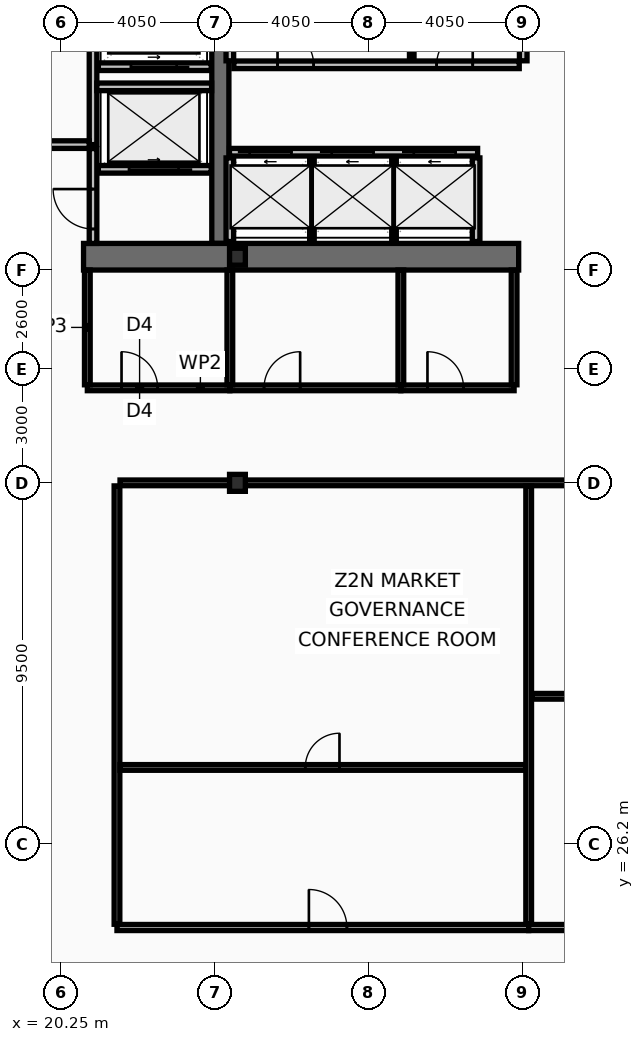
"""IFC4 building model, lengths in metres.
Left out: names, types, materials, properties, quantities, classifications, styles, units other than length and angle.
Written with IfcOpenShell. Run it as: python <this file> out.ifc"""

import sys

from ifc_helpers import new_model, si_unit, direction, frame, frame_2d, origin, origin_2d, place, context, subcontext, project, spatial, rectangle, i_section, extrude, element, fill, save


model = new_model("IFC4")
c1 = context("Model", 3, precision=1e-05, world=origin(), true_north=direction((0.0, 1.0)))
c2 = subcontext(c1, "Body", "Model", "MODEL_VIEW")
j1 = project(units=[si_unit("LENGTHUNIT", "METRE"), si_unit("PLANEANGLEUNIT", "RADIAN")], contexts=[c1])
p1 = place(None, origin())
s1 = spatial("IfcSite", under=j1, at=p1, CompositionType="ELEMENT")
p2 = place(p1, origin())
s2 = spatial("IfcBuilding", under=s1, at=p2, CompositionType="ELEMENT")
p3 = place(p2, frame((0.0, 0.0, 165.0)))
s3 = spatial("IfcBuildingStorey", under=s2, at=p3, CompositionType="ELEMENT", Elevation=165.0)
p4 = place(p3, frame((24.45, 42.0, 0.0), z_axis=(0.0, 0.0, 1.0), x_axis=(0.0, 1.0, 0.0)))
e1 = element("IfcWall", 1, at=p4, inside=s3, PredefinedType="SHEAR", context=c2, shape_type="SweptSolid", body=[
    extrude(rectangle(XDim=11.0, YDim=0.45, at=frame_2d((5.5, 0.0))), origin(), (0.0, 0.0, 1.0), 3.44),
])
p5 = place(p3, frame((32.3, 41.65, 0.0), z_axis=(0.0, 0.0, 1.0), x_axis=(-1.0, 0.0, 0.0)))
e2 = element("IfcWall", 2, at=p5, inside=s3, PredefinedType="SHEAR", context=c2, shape_type="SweptSolid", body=[
    extrude(rectangle(XDim=11.45, YDim=0.7, at=frame_2d((5.725, 0.0))), origin(), (0.0, 0.0, 1.0), 3.44),
])
for number, where, z_axis, x_axis in (
    (3, (24.9, 35.7, 0.0), (0.0, 0.0, 1.0), (1.0, 0.0, 0.0)),
    (4, (24.9, 41.65, 0.0), (0.0, 0.0, 1.0), (1.0, 0.0, 0.0)),
):
    element("IfcColumn", number, at=place(p3, frame(where, z_axis=z_axis, x_axis=x_axis)), inside=s3, PredefinedType="COLUMN", context=c2, shape_type="SweptSolid", body=[
        extrude(i_section(OverallWidth=0.416, OverallDepth=0.446, WebThickness=0.039, FlangeThickness=0.063, at=origin_2d()), origin(), (0.0, 0.0, 1.0), 3.6),
    ])
p6 = place(p3, frame((24.69, 44.4, 0.0), z_axis=(0.0, 0.0, 1.0), x_axis=(1.0, 0.0, 0.0)))
e5 = element("IfcWall", 5, at=p6, inside=s3, PredefinedType="PARTITIONING", context=c2, shape_type="SweptSolid", body=[
    extrude(rectangle(XDim=6.53, YDim=0.2, at=frame_2d((3.265, 0.0))), origin(), (0.0, 0.0, 1.0), 3.44),
])
p7 = place(p6, frame((0.53, 0.0, 0.0)))
e6 = element("IfcOpeningElement", 6, at=p7, cuts=e5, PredefinedType="OPENING", context=c2, shape_type="SweptSolid", body=[
    extrude(rectangle(XDim=1.1, YDim=2.18, at=frame_2d((0.55, 1.09))), frame((0.0, 0.11, 0.0), z_axis=(0.0, -1.0, 0.0), x_axis=(1.0, 0.0, 0.0)), (0.0, 0.0, 1.0), 0.22),
])
p8 = place(p6, frame((2.69, 0.0, 0.0)))
e7 = element("IfcOpeningElement", 7, at=p8, cuts=e5, PredefinedType="OPENING", context=c2, shape_type="SweptSolid", body=[
    extrude(rectangle(XDim=1.1, YDim=2.18, at=frame_2d((0.55, 1.09))), frame((0.0, 0.11, 0.0), z_axis=(0.0, -1.0, 0.0), x_axis=(1.0, 0.0, 0.0)), (0.0, 0.0, 1.0), 0.22),
])
p9 = place(p6, frame((4.85, 0.0, 0.0)))
e8 = element("IfcOpeningElement", 8, at=p9, cuts=e5, PredefinedType="OPENING", context=c2, shape_type="SweptSolid", body=[
    extrude(rectangle(XDim=1.1, YDim=2.18, at=frame_2d((0.55, 1.09))), frame((0.0, 0.11, 0.0), z_axis=(0.0, -1.0, 0.0), x_axis=(1.0, 0.0, 0.0)), (0.0, 0.0, 1.0), 0.22),
])
p10 = place(p3, frame((24.21, 43.95, 0.0), z_axis=(0.0, 0.0, 1.0), x_axis=(-1.0, 0.0, 0.0)))
e9 = element("IfcWall", 9, at=p10, inside=s3, PredefinedType="PARTITIONING", context=c2, shape_type="SweptSolid", body=[
    extrude(rectangle(XDim=2.97, YDim=0.2, at=frame_2d((1.485, 0.0))), origin(), (0.0, 0.0, 1.0), 3.44),
])
p11 = place(p10, frame((0.86, 0.0, 0.0)))
e10 = element("IfcOpeningElement", 10, at=p11, cuts=e9, PredefinedType="OPENING", context=c2, shape_type="SweptSolid", body=[
    extrude(rectangle(XDim=1.3, YDim=2.18, at=frame_2d((0.65, 1.09))), frame((0.0, 0.11, 0.0), z_axis=(0.0, -1.0, 0.0), x_axis=(1.0, 0.0, 0.0)), (0.0, 0.0, 1.0), 0.22),
])
p12 = place(p3, frame((24.21, 46.65, 0.0), z_axis=(0.0, 0.0, 1.0), x_axis=(-1.0, 0.0, 0.0)))
e11 = element("IfcWall", 11, at=p12, inside=s3, PredefinedType="PARTITIONING", context=c2, shape_type="SweptSolid", body=[
    extrude(rectangle(XDim=2.97, YDim=0.2, at=frame_2d((1.485, 0.0))), origin(), (0.0, 0.0, 1.0), 3.44),
])
p13 = place(p12, frame((0.91, 0.0, 0.0)))
e12 = element("IfcOpeningElement", 12, at=p13, cuts=e11, PredefinedType="OPENING", context=c2, shape_type="SweptSolid", body=[
    extrude(rectangle(XDim=1.2, YDim=2.18, at=frame_2d((0.6, 1.09))), frame((0.0, 0.11, 0.0), z_axis=(0.0, -1.0, 0.0), x_axis=(1.0, 0.0, 0.0)), (0.0, 0.0, 1.0), 0.22),
])
p14 = place(p3, frame((21.1, 44.6, 0.0), z_axis=(0.0, 0.0, 1.0), x_axis=(0.0, 1.0, 0.0)))
e13 = element("IfcWall", 13, at=p14, inside=s3, PredefinedType="PARTITIONING", context=c2, shape_type="SweptSolid", body=[
    extrude(rectangle(XDim=4.3, YDim=0.2, at=frame_2d((2.15, 0.0))), origin(), (0.0, 0.0, 1.0), 3.44),
])
p15 = place(p3, frame((16.9, 44.6, 0.0), z_axis=(0.0, 0.0, 1.0), x_axis=(1.0, 0.0, 0.0)))
e14 = element("IfcWall", 14, at=p15, inside=s3, PredefinedType="PARTITIONING", context=c2, shape_type="SweptSolid", body=[
    extrude(rectangle(XDim=4.1, YDim=0.2, at=frame_2d((2.05, 0.0))), origin(), (0.0, 0.0, 1.0), 3.44),
])
p16 = place(p15, frame((1.25, 0.0, 0.0)))
e15 = element("IfcOpeningElement", 15, at=p16, cuts=e14, PredefinedType="OPENING", context=c2, shape_type="SweptSolid", body=[
    extrude(rectangle(XDim=1.05, YDim=2.15, at=frame_2d((0.525, 1.075))), frame((0.0, 0.11, 0.0), z_axis=(0.0, -1.0, 0.0), x_axis=(1.0, 0.0, 0.0)), (0.0, 0.0, 1.0), 0.22),
])
p17 = place(p3, frame((21.2, 46.12, 0.0), z_axis=(0.0, 0.0, 1.0), x_axis=(1.0, 0.0, 0.0)))
e16 = element("IfcWall", 16, at=p17, inside=s3, PredefinedType="PARTITIONING", context=c2, shape_type="SweptSolid", body=[
    extrude(rectangle(XDim=3.02, YDim=0.2, at=frame_2d((1.51, 0.0))), origin(), (0.0, 0.0, 1.0), 3.44),
])
p18 = place(p3, frame((21.1, 42.0, 0.0), z_axis=(0.0, 0.0, 1.0), x_axis=(0.0, 1.0, 0.0)))
e17 = element("IfcWall", 17, at=p18, inside=s3, PredefinedType="PARTITIONING", context=c2, shape_type="SweptSolid", body=[
    extrude(rectangle(XDim=2.495, YDim=0.2, at=frame_2d((1.248, 0.0))), origin(), (0.0, 0.0, 1.0), 3.44),
])
p19 = place(p18, frame((0.38, 0.0, 0.0)))
e18 = element("IfcOpeningElement", 18, at=p19, cuts=e17, PredefinedType="OPENING", context=c2, shape_type="SweptSolid", body=[
    extrude(rectangle(XDim=1.05, YDim=2.15, at=frame_2d((0.525, 1.075))), frame((0.0, 0.11, 0.0), z_axis=(0.0, -1.0, 0.0), x_axis=(1.0, 0.0, 0.0)), (0.0, 0.0, 1.0), 0.22),
])
for number, where, z_axis, x_axis in (
    (19, (24.7, 46.805, 0.0), (0.0, 0.0, 1.0), (0.0, 1.0, 0.0)),
    (20, (32.42, 46.805, 0.0), (0.0, 0.0, 1.0), (0.0, 1.0, 0.0)),
):
    element("IfcWall", number, at=place(p3, frame(where, z_axis=z_axis, x_axis=x_axis)), inside=s3, PredefinedType="PARTITIONING", context=c2, shape_type="SweptSolid", body=[
        extrude(rectangle(XDim=5.99, YDim=0.2, at=frame_2d((2.995, 0.0))), origin(), (0.0, 0.0, 1.0), 3.44),
    ])
p20 = place(p3, frame((29.486, 46.805, 0.0), z_axis=(0.0, 0.0, 1.0), x_axis=(0.0, 1.0, 0.0)))
e21 = element("IfcWall", 21, at=p20, inside=s3, PredefinedType="PARTITIONING", context=c2, shape_type="SweptSolid", body=[
    extrude(rectangle(XDim=5.99, YDim=0.12, at=frame_2d((2.995, 0.0))), origin(), (0.0, 0.0, 1.0), 3.44),
])
p21 = place(p3, frame((24.805, 46.7, 0.0), z_axis=(0.0, 0.0, 1.0), x_axis=(1.0, 0.0, 0.0)))
e22 = element("IfcWall", 22, at=p21, inside=s3, PredefinedType="PARTITIONING", context=c2, shape_type="SweptSolid", body=[
    extrude(rectangle(XDim=7.51, YDim=0.2, at=frame_2d((3.755, 0.0))), origin(), (0.0, 0.0, 1.0), 3.44),
])
p22 = place(p21, frame((1.15, 0.0, 0.0)))
e23 = element("IfcOpeningElement", 23, at=p22, cuts=e22, PredefinedType="OPENING", context=c2, shape_type="SweptSolid", body=[
    extrude(rectangle(XDim=0.95, YDim=2.1, at=frame_2d((0.475, 1.05))), frame((0.0, 0.11, 0.0), z_axis=(0.0, -1.0, 0.0), x_axis=(1.0, 0.0, 0.0)), (0.0, 0.0, 1.0), 0.22),
])
p23 = place(p21, frame((5.336, 0.0, 0.0)))
e24 = element("IfcOpeningElement", 24, at=p23, cuts=e22, PredefinedType="OPENING", context=c2, shape_type="SweptSolid", body=[
    extrude(rectangle(XDim=0.95, YDim=2.1, at=frame_2d((0.475, 1.05))), frame((0.0, 0.11, 0.0), z_axis=(0.0, -1.0, 0.0), x_axis=(1.0, 0.0, 0.0)), (0.0, 0.0, 1.0), 0.22),
])
for number, where, z_axis, x_axis in (
    (25, (24.7, 42.05, 0.0), (0.0, 0.0, 1.0), (0.0, 1.0, 0.0)),
    (26, (31.18, 42.05, 0.0), (0.0, 0.0, 1.0), (0.0, 1.0, 0.0)),
):
    element("IfcWall", number, at=place(p3, frame(where, z_axis=z_axis, x_axis=x_axis)), inside=s3, PredefinedType="PARTITIONING", context=c2, shape_type="SweptSolid", body=[
        extrude(rectangle(XDim=2.2, YDim=0.2, at=frame_2d((1.1, 0.0))), origin(), (0.0, 0.0, 1.0), 3.44),
    ])
for number, where, z_axis, x_axis in (
    (27, (26.86, 42.05, 0.0), (0.0, 0.0, 1.0), (0.0, 1.0, 0.0)),
    (28, (29.02, 42.05, 0.0), (0.0, 0.0, 1.0), (0.0, 1.0, 0.0)),
):
    element("IfcWall", number, at=place(p3, frame(where, z_axis=z_axis, x_axis=x_axis)), inside=s3, PredefinedType="PARTITIONING", context=c2, shape_type="SweptSolid", body=[
        extrude(rectangle(XDim=2.2, YDim=0.12, at=frame_2d((1.1, 0.0))), origin(), (0.0, 0.0, 1.0), 3.44),
    ])
p24 = place(p3, frame((20.95, 38.2, 0.0), z_axis=(0.0, 0.0, 1.0), x_axis=(1.0, 0.0, 0.0)))
e29 = element("IfcWall", 29, at=p24, inside=s3, PredefinedType="PARTITIONING", context=c2, shape_type="SweptSolid", body=[
    extrude(rectangle(XDim=3.75, YDim=0.15, at=frame_2d((1.875, 0.0))), origin(), (0.0, 0.0, 1.0), 2.73),
])
p25 = place(p24, frame((0.9, 0.0, 0.0)))
e30 = element("IfcOpeningElement", 30, at=p25, cuts=e29, PredefinedType="OPENING", context=c2, shape_type="SweptSolid", body=[
    extrude(rectangle(XDim=0.95, YDim=2.05, at=frame_2d((0.475, 1.025))), frame((0.0, 0.085, 0.0), z_axis=(0.0, -1.0, 0.0), x_axis=(1.0, 0.0, 0.0)), (0.0, 0.0, 1.0), 0.17),
])
p26 = place(p3, frame((24.7, 38.2, 0.0), z_axis=(0.0, 0.0, 1.0), x_axis=(1.0, 0.0, 0.0)))
e31 = element("IfcWall", 31, at=p26, inside=s3, PredefinedType="PARTITIONING", context=c2, shape_type="SweptSolid", body=[
    extrude(rectangle(XDim=4.5, YDim=0.15, at=frame_2d((2.25, 0.0))), origin(), (0.0, 0.0, 1.0), 2.73),
])
p27 = place(p26, frame((0.9, 0.0, 0.0)))
e32 = element("IfcOpeningElement", 32, at=p27, cuts=e31, PredefinedType="OPENING", context=c2, shape_type="SweptSolid", body=[
    extrude(rectangle(XDim=0.95, YDim=2.05, at=frame_2d((0.475, 1.025))), frame((0.0, 0.085, 0.0), z_axis=(0.0, -1.0, 0.0), x_axis=(1.0, 0.0, 0.0)), (0.0, 0.0, 1.0), 0.17),
])
p28 = place(p3, frame((29.2, 38.2, 0.0), z_axis=(0.0, 0.0, 1.0), x_axis=(1.0, 0.0, 0.0)))
e33 = element("IfcWall", 33, at=p28, inside=s3, PredefinedType="PARTITIONING", context=c2, shape_type="SweptSolid", body=[
    extrude(rectangle(XDim=2.98, YDim=0.15, at=frame_2d((1.49, 0.0))), origin(), (0.0, 0.0, 1.0), 2.73),
])
p29 = place(p28, frame((0.7, 0.0, 0.0)))
e34 = element("IfcOpeningElement", 34, at=p29, cuts=e33, PredefinedType="OPENING", context=c2, shape_type="SweptSolid", body=[
    extrude(rectangle(XDim=0.95, YDim=2.05, at=frame_2d((0.475, 1.025))), frame((0.0, 0.085, 0.0), z_axis=(0.0, -1.0, 0.0), x_axis=(1.0, 0.0, 0.0)), (0.0, 0.0, 1.0), 0.17),
])
p30 = place(p3, frame((20.95, 38.28, 0.0), z_axis=(0.0, 0.0, 1.0), x_axis=(0.0, 1.0, 0.0)))
e35 = element("IfcWall", 35, at=p30, inside=s3, PredefinedType="PARTITIONING", context=c2, shape_type="SweptSolid", body=[
    extrude(rectangle(XDim=3.02, YDim=0.15, at=frame_2d((1.51, 0.0))), origin(), (0.0, 0.0, 1.0), 3.44),
])
p31 = place(p3, frame((24.7, 38.28, 0.0), z_axis=(0.0, 0.0, 1.0), x_axis=(0.0, 1.0, 0.0)))
e36 = element("IfcWall", 36, at=p31, inside=s3, PredefinedType="PARTITIONING", context=c2, shape_type="SweptSolid", body=[
    extrude(rectangle(XDim=3.02, YDim=0.15, at=frame_2d((1.51, 0.0))), origin(), (0.0, 0.0, 1.0), 2.73),
])
for number, where, z_axis, x_axis in (
    (37, (29.2, 38.28, 0.0), (0.0, 0.0, 1.0), (0.0, 1.0, 0.0)),
    (38, (32.18, 38.28, 0.0), (0.0, 0.0, 1.0), (0.0, 1.0, 0.0)),
):
    element("IfcWall", number, at=place(p3, frame(where, z_axis=z_axis, x_axis=x_axis)), inside=s3, PredefinedType="PARTITIONING", context=c2, shape_type="SweptSolid", body=[
        extrude(rectangle(XDim=3.02, YDim=0.15, at=frame_2d((1.51, 0.0))), origin(), (0.0, 0.0, 1.0), 3.44),
    ])
p32 = place(p3, frame((21.73, 24.085, 0.0), z_axis=(0.0, 0.0, 1.0), x_axis=(0.0, 1.0, 0.0)))
e39 = element("IfcWall", 39, at=p32, inside=s3, PredefinedType="PARTITIONING", context=c2, shape_type="SweptSolid", body=[
    extrude(rectangle(XDim=11.535, YDim=0.15, at=frame_2d((5.768, 0.0))), origin(), (0.0, 0.0, 1.0), 2.93),
])
p33 = place(p3, frame((21.81, 35.7, 0.0), z_axis=(0.0, 0.0, 1.0), x_axis=(1.0, 0.0, 0.0)))
e40 = element("IfcWall", 40, at=p33, inside=s3, PredefinedType="PARTITIONING", context=c2, shape_type="SweptSolid", body=[
    extrude(rectangle(XDim=44.995, YDim=0.15, at=frame_2d((22.498, 0.0))), origin(), (0.0, 0.0, 1.0), 2.73),
])
p34 = place(p3, frame((21.73, 24.0, 0.0), z_axis=(0.0, 0.0, 1.0), x_axis=(1.0, 0.0, 0.0)))
e41 = element("IfcWall", 41, at=p34, inside=s3, PredefinedType="PARTITIONING", context=c2, shape_type="SweptSolid", body=[
    extrude(rectangle(XDim=10.834, YDim=0.16, at=frame_2d((5.417, 0.0))), origin(), (0.0, 0.0, 1.0), 2.73),
])
p35 = place(p34, frame((5.05, 0.0, 0.0)))
e42 = element("IfcOpeningElement", 42, at=p35, cuts=e41, PredefinedType="OPENING", context=c2, shape_type="SweptSolid", body=[
    extrude(rectangle(XDim=1.0, YDim=2.05, at=frame_2d((0.5, 1.025))), frame((0.0, 0.09, 0.0), z_axis=(0.0, -1.0, 0.0), x_axis=(1.0, 0.0, 0.0)), (0.0, 0.0, 1.0), 0.18),
])
p36 = place(p3, frame((21.81, 28.212, 0.0), z_axis=(0.0, 0.0, 1.0), x_axis=(1.0, 0.0, 0.0)))
e43 = element("IfcWall", 43, at=p36, inside=s3, PredefinedType="PARTITIONING", context=c2, shape_type="SweptSolid", body=[
    extrude(rectangle(XDim=10.674, YDim=0.15, at=frame_2d((5.337, 0.0))), origin(), (0.0, 0.0, 1.0), 2.73),
])
p37 = place(p36, frame((4.875, 0.0, 0.0)))
e44 = element("IfcOpeningElement", 44, at=p37, cuts=e43, PredefinedType="OPENING", context=c2, shape_type="SweptSolid", body=[
    extrude(rectangle(XDim=0.9, YDim=2.05, at=frame_2d((0.45, 1.025))), frame((0.0, 0.085, 0.0), z_axis=(0.0, -1.0, 0.0), x_axis=(1.0, 0.0, 0.0)), (0.0, 0.0, 1.0), 0.17),
])
p38 = place(p3, frame((32.564, 24.0, 0.0), z_axis=(0.0, 0.0, 1.0), x_axis=(1.0, 0.0, 0.0)))
e45 = element("IfcWall", 45, at=p38, inside=s3, PredefinedType="PARTITIONING", context=c2, shape_type="SweptSolid", body=[
    extrude(rectangle(XDim=7.674, YDim=0.16, at=frame_2d((3.837, 0.0))), origin(), (0.0, 0.0, 1.0), 3.44),
])
p39 = place(p38, frame((3.723, 0.0, 0.0)))
e46 = element("IfcOpeningElement", 46, at=p39, cuts=e45, PredefinedType="OPENING", context=c2, shape_type="SweptSolid", body=[
    extrude(rectangle(XDim=1.0, YDim=2.05, at=frame_2d((0.5, 1.025))), frame((0.0, 0.09, 0.0), z_axis=(0.0, -1.0, 0.0), x_axis=(1.0, 0.0, 0.0)), (0.0, 0.0, 1.0), 0.18),
])
p40 = place(p3, frame((32.564, 24.085, 0.0), z_axis=(0.0, 0.0, 1.0), x_axis=(0.0, 1.0, 0.0)))
e47 = element("IfcWall", 47, at=p40, inside=s3, PredefinedType="PARTITIONING", context=c2, shape_type="SweptSolid", body=[
    extrude(rectangle(XDim=11.535, YDim=0.15, at=frame_2d((5.768, 0.0))), origin(), (0.0, 0.0, 1.0), 2.93),
])
p41 = place(p3, frame((32.644, 30.084, 0.0), z_axis=(0.0, 0.0, 1.0), x_axis=(1.0, 0.0, 0.0)))
e48 = element("IfcWall", 48, at=p41, inside=s3, PredefinedType="PARTITIONING", context=c2, shape_type="SweptSolid", body=[
    extrude(rectangle(XDim=7.514, YDim=0.15, at=frame_2d((3.757, 0.0))), origin(), (0.0, 0.0, 1.0), 2.93),
])
p42 = place(p41, frame((3.453, 0.0, 0.0)))
e49 = element("IfcOpeningElement", 49, at=p42, cuts=e48, PredefinedType="OPENING", context=c2, shape_type="SweptSolid", body=[
    extrude(rectangle(XDim=0.9, YDim=2.05, at=frame_2d((0.45, 1.025))), frame((0.0, 0.085, 0.0), z_axis=(0.0, -1.0, 0.0), x_axis=(1.0, 0.0, 0.0)), (0.0, 0.0, 1.0), 0.17),
])
p43 = place(p7, origin())
e50 = element("IfcDoor", 50, at=p43, inside=s3, OperationType="SLIDING_TO_LEFT", PredefinedType="DOOR", context=c2, shape_type="SweptSolid", body=[
    extrude(rectangle(XDim=1.1, YDim=2.18, at=frame_2d((0.55, 1.09))), frame((0.0, 0.025, 0.0), z_axis=(0.0, -1.0, 0.0), x_axis=(1.0, 0.0, 0.0)), (0.0, 0.0, 1.0), 0.05),
])
fill(e6, e50)
p44 = place(p8, origin())
e51 = element("IfcDoor", 51, at=p44, inside=s3, OperationType="SLIDING_TO_LEFT", PredefinedType="DOOR", context=c2, shape_type="SweptSolid", body=[
    extrude(rectangle(XDim=1.1, YDim=2.18, at=frame_2d((0.55, 1.09))), frame((0.0, 0.025, 0.0), z_axis=(0.0, -1.0, 0.0), x_axis=(1.0, 0.0, 0.0)), (0.0, 0.0, 1.0), 0.05),
])
fill(e7, e51)
p45 = place(p9, origin())
e52 = element("IfcDoor", 52, at=p45, inside=s3, OperationType="SLIDING_TO_LEFT", PredefinedType="DOOR", context=c2, shape_type="SweptSolid", body=[
    extrude(rectangle(XDim=1.1, YDim=2.18, at=frame_2d((0.55, 1.09))), frame((0.0, 0.025, 0.0), z_axis=(0.0, -1.0, 0.0), x_axis=(1.0, 0.0, 0.0)), (0.0, 0.0, 1.0), 0.05),
])
fill(e8, e52)
p46 = place(p11, origin())
e53 = element("IfcDoor", 53, at=p46, inside=s3, OperationType="SLIDING_TO_LEFT", PredefinedType="DOOR", context=c2, shape_type="SweptSolid", body=[
    extrude(rectangle(XDim=1.3, YDim=2.18, at=frame_2d((0.65, 1.09))), frame((0.0, 0.025, 0.0), z_axis=(0.0, -1.0, 0.0), x_axis=(1.0, 0.0, 0.0)), (0.0, 0.0, 1.0), 0.05),
])
fill(e10, e53)
p47 = place(p13, origin())
e54 = element("IfcDoor", 54, at=p47, inside=s3, OperationType="SLIDING_TO_LEFT", PredefinedType="DOOR", context=c2, shape_type="SweptSolid", body=[
    extrude(rectangle(XDim=1.2, YDim=2.18, at=frame_2d((0.6, 1.09))), frame((0.0, 0.025, 0.0), z_axis=(0.0, -1.0, 0.0), x_axis=(1.0, 0.0, 0.0)), (0.0, 0.0, 1.0), 0.05),
])
fill(e12, e54)
p48 = place(p19, origin())
e55 = element("IfcDoor", 55, at=p48, inside=s3, OperationType="SINGLE_SWING_RIGHT", PredefinedType="DOOR", context=c2, shape_type="SweptSolid", body=[
    extrude(rectangle(XDim=1.05, YDim=2.15, at=frame_2d((0.525, 1.075))), frame((0.0, 0.025, 0.0), z_axis=(0.0, -1.0, 0.0), x_axis=(1.0, 0.0, 0.0)), (0.0, 0.0, 1.0), 0.05),
])
fill(e18, e55)
p49 = place(p22, origin())
e56 = element("IfcDoor", 56, at=p49, inside=s3, OperationType="SINGLE_SWING_LEFT", PredefinedType="DOOR", context=c2, shape_type="SweptSolid", body=[
    extrude(rectangle(XDim=0.95, YDim=2.1, at=frame_2d((0.475, 1.05))), frame((0.0, 0.025, 0.0), z_axis=(0.0, -1.0, 0.0), x_axis=(1.0, 0.0, 0.0)), (0.0, 0.0, 1.0), 0.05),
])
fill(e23, e56)
p50 = place(p23, origin())
e57 = element("IfcDoor", 57, at=p50, inside=s3, OperationType="SINGLE_SWING_RIGHT", PredefinedType="DOOR", context=c2, shape_type="SweptSolid", body=[
    extrude(rectangle(XDim=0.95, YDim=2.1, at=frame_2d((0.475, 1.05))), frame((0.0, 0.025, 0.0), z_axis=(0.0, -1.0, 0.0), x_axis=(1.0, 0.0, 0.0)), (0.0, 0.0, 1.0), 0.05),
])
fill(e24, e57)
p51 = place(p25, origin())
e58 = element("IfcDoor", 58, at=p51, inside=s3, OperationType="SINGLE_SWING_LEFT", PredefinedType="DOOR", context=c2, shape_type="SweptSolid", body=[
    extrude(rectangle(XDim=0.95, YDim=2.05, at=frame_2d((0.475, 1.025))), frame((0.0, 0.025, 0.0), z_axis=(0.0, -1.0, 0.0), x_axis=(1.0, 0.0, 0.0)), (0.0, 0.0, 1.0), 0.05),
])
fill(e30, e58)
p52 = place(p27, origin())
e59 = element("IfcDoor", 59, at=p52, inside=s3, OperationType="SINGLE_SWING_RIGHT", PredefinedType="DOOR", context=c2, shape_type="SweptSolid", body=[
    extrude(rectangle(XDim=0.95, YDim=2.05, at=frame_2d((0.475, 1.025))), frame((0.0, 0.025, 0.0), z_axis=(0.0, -1.0, 0.0), x_axis=(1.0, 0.0, 0.0)), (0.0, 0.0, 1.0), 0.05),
])
fill(e32, e59)
p53 = place(p29, origin())
e60 = element("IfcDoor", 60, at=p53, inside=s3, OperationType="SINGLE_SWING_LEFT", PredefinedType="DOOR", context=c2, shape_type="SweptSolid", body=[
    extrude(rectangle(XDim=0.95, YDim=2.05, at=frame_2d((0.475, 1.025))), frame((0.0, 0.025, 0.0), z_axis=(0.0, -1.0, 0.0), x_axis=(1.0, 0.0, 0.0)), (0.0, 0.0, 1.0), 0.05),
])
fill(e34, e60)
p54 = place(p35, origin())
e61 = element("IfcDoor", 61, at=p54, inside=s3, OperationType="SINGLE_SWING_LEFT", PredefinedType="DOOR", context=c2, shape_type="SweptSolid", body=[
    extrude(rectangle(XDim=1.0, YDim=2.05, at=frame_2d((0.5, 1.025))), frame((0.0, 0.025, 0.0), z_axis=(0.0, -1.0, 0.0), x_axis=(1.0, 0.0, 0.0)), (0.0, 0.0, 1.0), 0.05),
])
fill(e42, e61)
p55 = place(p37, origin())
e62 = element("IfcDoor", 62, at=p55, inside=s3, OperationType="SINGLE_SWING_RIGHT", PredefinedType="DOOR", context=c2, shape_type="SweptSolid", body=[
    extrude(rectangle(XDim=0.9, YDim=2.05, at=frame_2d((0.45, 1.025))), frame((0.0, 0.025, 0.0), z_axis=(0.0, -1.0, 0.0), x_axis=(1.0, 0.0, 0.0)), (0.0, 0.0, 1.0), 0.05),
])
fill(e44, e62)
save(model, sys.argv[1])
